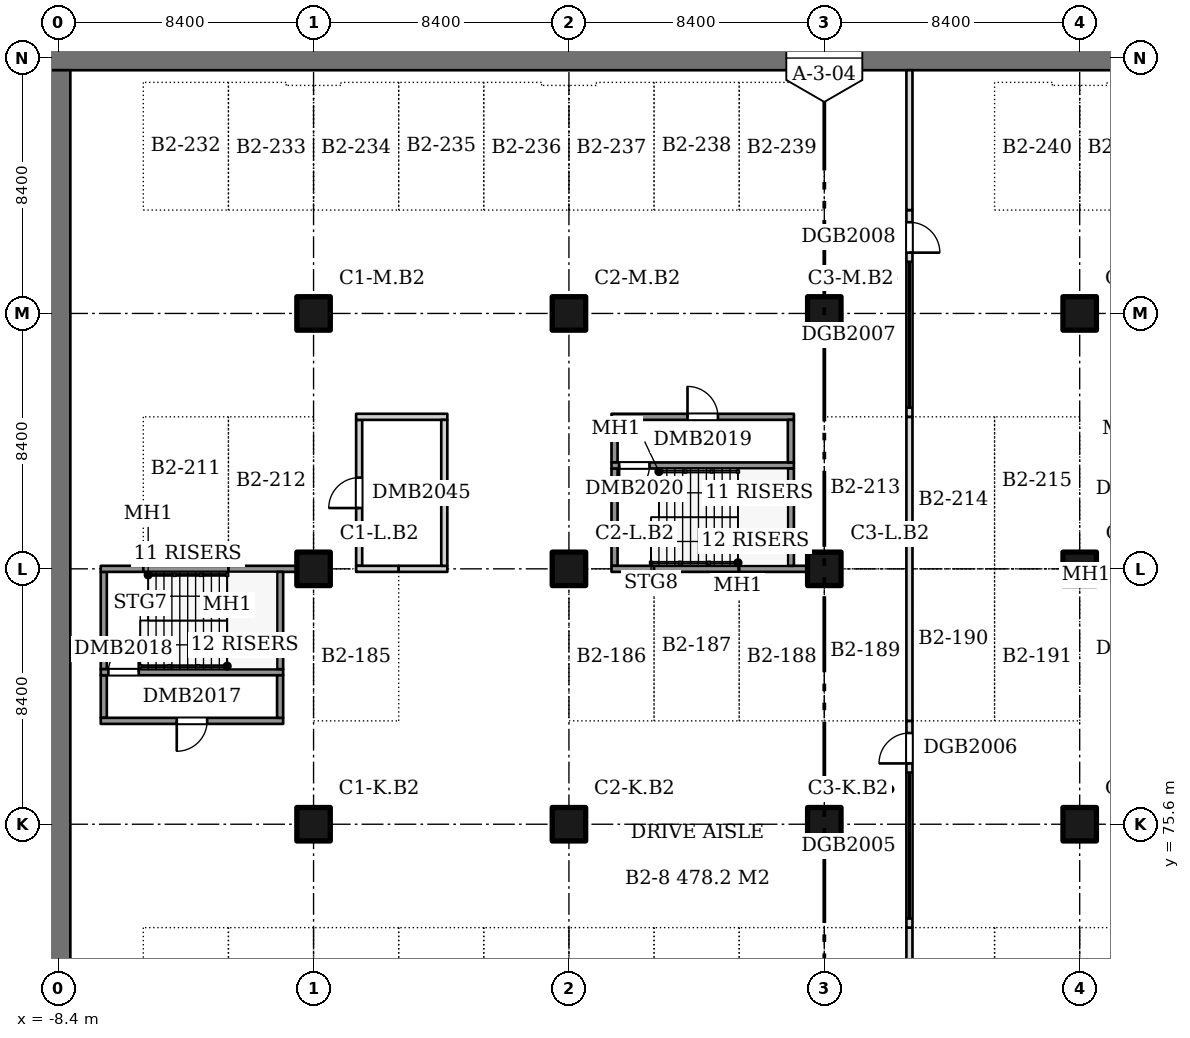
"""IFC4 building model, lengths in metres.
Left out: names, types, materials, properties, quantities, classifications, styles, units other than length and angle.
Written with IfcOpenShell. Run it as: python <this file> out.ifc"""

import sys

from ifc_helpers import new_model, si_unit, direction, frame, frame_2d, origin, origin_2d, place, context, subcontext, project, spatial, rectangle, extrude, element, fill, save


model = new_model("IFC4")
c1 = context("Model", 3, precision=1e-05, world=origin(), true_north=direction((0.0, 1.0)))
c2 = subcontext(c1, "Body", "Model", "MODEL_VIEW")
j1 = project(units=[si_unit("LENGTHUNIT", "METRE"), si_unit("PLANEANGLEUNIT", "RADIAN")], contexts=[c1])
p1 = place(None, origin())
s1 = spatial("IfcSite", under=j1, at=p1, CompositionType="ELEMENT")
p2 = place(p1, origin())
s2 = spatial("IfcBuilding", under=s1, at=p2, CompositionType="ELEMENT")
p3 = place(p2, frame((0.0, 0.0, -8.0)))
s3 = spatial("IfcBuildingStorey", under=s2, at=p3, CompositionType="ELEMENT", Elevation=-8.0)
p4 = place(p3, frame((-8.8, 100.8, 0.0), z_axis=(0.0, 0.0, 1.0), x_axis=(1.0, 0.0, 0.0)))
e1 = element("IfcWall", 1, at=p4, inside=s3, PredefinedType="SOLIDWALL", context=c2, shape_type="SweptSolid", body=[
    extrude(rectangle(XDim=135.2, YDim=0.8, at=frame_2d((67.6, 0.0))), origin(), (0.0, 0.0, 1.0), 3.7),
])
p5 = place(p3, frame((-8.4, 0.4, 0.0), z_axis=(0.0, 0.0, 1.0), x_axis=(0.0, 1.0, 0.0)))
e2 = element("IfcWall", 2, at=p5, inside=s3, PredefinedType="SOLIDWALL", context=c2, shape_type="SweptSolid", body=[
    extrude(rectangle(XDim=100.0, YDim=0.8, at=frame_2d((50.0, 0.0))), origin(), (0.0, 0.0, 1.0), 3.7),
])
for number, where, z_axis, x_axis in (
    (3, (0.0, 75.6, 0.0), (0.0, 0.0, 1.0), (1.0, 0.0, 0.0)),
    (4, (0.0, 84.0, 0.0), (0.0, 0.0, 1.0), (1.0, 0.0, 0.0)),
    (5, (0.0, 92.4, 0.0), (0.0, 0.0, 1.0), (1.0, 0.0, 0.0)),
    (6, (8.4, 75.6, 0.0), (0.0, 0.0, 1.0), (1.0, 0.0, 0.0)),
    (7, (8.4, 84.0, 0.0), (0.0, 0.0, 1.0), (1.0, 0.0, 0.0)),
    (8, (8.4, 92.4, 0.0), (0.0, 0.0, 1.0), (1.0, 0.0, 0.0)),
    (9, (16.8, 75.6, 0.0), (0.0, 0.0, 1.0), (1.0, 0.0, 0.0)),
    (10, (16.8, 84.0, 0.0), (0.0, 0.0, 1.0), (1.0, 0.0, 0.0)),
    (11, (16.8, 92.4, 0.0), (0.0, 0.0, 1.0), (1.0, 0.0, 0.0)),
    (12, (25.2, 75.6, 0.0), (0.0, 0.0, 1.0), (1.0, 0.0, 0.0)),
    (13, (25.2, 84.0, 0.0), (0.0, 0.0, 1.0), (1.0, 0.0, 0.0)),
    (14, (25.2, 92.4, 0.0), (0.0, 0.0, 1.0), (1.0, 0.0, 0.0)),
):
    element("IfcColumn", number, at=place(p3, frame(where, z_axis=z_axis, x_axis=x_axis)), inside=s3, PredefinedType="COLUMN", context=c2, shape_type="SweptSolid", body=[
        extrude(rectangle(XDim=1.1, YDim=1.1, at=origin_2d()), origin(), (0.0, 0.0, 1.0), 3.7),
    ])
p6 = place(p3, frame((-6.9, 79.1, 0.0), z_axis=(0.0, 0.0, 1.0), x_axis=(0.0, 1.0, 0.0)))
e15 = element("IfcWall", 15, at=p6, inside=s3, PredefinedType="SOLIDWALL", context=c2, shape_type="SweptSolid", body=[
    extrude(rectangle(XDim=1.4, YDim=0.2, at=frame_2d((0.7, 0.0))), origin(), (0.0, 0.0, 1.0), 3.7),
])
p7 = place(p3, frame((-7.0, 79.0, 0.0), z_axis=(0.0, 0.0, 1.0), x_axis=(1.0, 0.0, 0.0)))
e16 = element("IfcWall", 16, at=p7, inside=s3, PredefinedType="SOLIDWALL", context=c2, shape_type="SweptSolid", body=[
    extrude(rectangle(XDim=6.0, YDim=0.2, at=frame_2d((3.0, 0.0))), origin(), (0.0, 0.0, 1.0), 3.7),
])
p8 = place(p7, frame((2.5, 0.0, 0.0)))
e17 = element("IfcOpeningElement", 17, at=p8, cuts=e16, PredefinedType="OPENING", context=c2, shape_type="SweptSolid", body=[
    extrude(rectangle(XDim=1.0, YDim=2.1, at=frame_2d((0.5, 1.05))), frame((0.0, 0.11, 0.0), z_axis=(0.0, -1.0, 0.0), x_axis=(1.0, 0.0, 0.0)), (0.0, 0.0, 1.0), 0.22),
])
p9 = place(p3, frame((-6.9, 80.7, 0.0), z_axis=(0.0, 0.0, 1.0), x_axis=(0.0, 1.0, 0.0)))
e18 = element("IfcWall", 18, at=p9, inside=s3, PredefinedType="SOLIDWALL", context=c2, shape_type="SweptSolid", body=[
    extrude(rectangle(XDim=3.2, YDim=0.2, at=frame_2d((1.6, 0.0))), origin(), (0.0, 0.0, 1.0), 3.7),
])
p10 = place(p3, frame((-7.0, 80.6, 0.0), z_axis=(0.0, 0.0, 1.0), x_axis=(1.0, 0.0, 0.0)))
e19 = element("IfcWall", 19, at=p10, inside=s3, PredefinedType="SOLIDWALL", context=c2, shape_type="SweptSolid", body=[
    extrude(rectangle(XDim=6.0, YDim=0.2, at=frame_2d((3.0, 0.0))), origin(), (0.0, 0.0, 1.0), 3.7),
])
p11 = place(p10, frame((0.25, 0.0, 0.0)))
e20 = element("IfcOpeningElement", 20, at=p11, cuts=e19, PredefinedType="OPENING", context=c2, shape_type="SweptSolid", body=[
    extrude(rectangle(XDim=1.0, YDim=2.1, at=frame_2d((0.5, 1.05))), frame((0.0, 0.11, 0.0), z_axis=(0.0, -1.0, 0.0), x_axis=(1.0, 0.0, 0.0)), (0.0, 0.0, 1.0), 0.22),
])
p12 = place(p3, frame((-7.0, 84.0, 0.0), z_axis=(0.0, 0.0, 1.0), x_axis=(1.0, 0.0, 0.0)))
e21 = element("IfcWall", 21, at=p12, inside=s3, PredefinedType="SOLIDWALL", context=c2, shape_type="SweptSolid", body=[
    extrude(rectangle(XDim=1.4, YDim=0.2, at=frame_2d((0.7, 0.0))), origin(), (0.0, 0.0, 1.0), 3.7),
])
p13 = place(p3, frame((-5.6, 84.0, 0.0), z_axis=(0.0, 0.0, 1.0), x_axis=(1.0, 0.0, 0.0)))
e22 = element("IfcWall", 22, at=p13, inside=s3, PredefinedType="SOLIDWALL", context=c2, shape_type="SweptSolid", body=[
    extrude(rectangle(XDim=2.8, YDim=0.2, at=frame_2d((1.4, 0.0))), origin(), (0.0, 0.0, 1.0), 3.7),
])
p14 = place(p3, frame((-2.8, 84.0, 0.0), z_axis=(0.0, 0.0, 1.0), x_axis=(1.0, 0.0, 0.0)))
e23 = element("IfcWall", 23, at=p14, inside=s3, PredefinedType="SOLIDWALL", context=c2, shape_type="SweptSolid", body=[
    extrude(rectangle(XDim=2.25, YDim=0.2, at=frame_2d((1.125, 0.0))), origin(), (0.0, 0.0, 1.0), 3.7),
])
p15 = place(p3, frame((-1.1, 79.1, 0.0), z_axis=(0.0, 0.0, 1.0), x_axis=(0.0, 1.0, 0.0)))
e24 = element("IfcWall", 24, at=p15, inside=s3, PredefinedType="SOLIDWALL", context=c2, shape_type="SweptSolid", body=[
    extrude(rectangle(XDim=1.4, YDim=0.2, at=frame_2d((0.7, 0.0))), origin(), (0.0, 0.0, 1.0), 3.7),
])
p16 = place(p3, frame((-1.1, 80.7, 0.0), z_axis=(0.0, 0.0, 1.0), x_axis=(0.0, 1.0, 0.0)))
e25 = element("IfcWall", 25, at=p16, inside=s3, PredefinedType="SOLIDWALL", context=c2, shape_type="SweptSolid", body=[
    extrude(rectangle(XDim=3.2, YDim=0.2, at=frame_2d((1.6, 0.0))), origin(), (0.0, 0.0, 1.0), 3.7),
])
p17 = place(p3, frame((1.5, 84.1, 0.0), z_axis=(0.0, 0.0, 1.0), x_axis=(0.0, 1.0, 0.0)))
e26 = element("IfcWall", 26, at=p17, inside=s3, PredefinedType="PARTITIONING", context=c2, shape_type="SweptSolid", body=[
    extrude(rectangle(XDim=4.8, YDim=0.2, at=frame_2d((2.4, 0.0))), origin(), (0.0, 0.0, 1.0), 3.7),
])
p18 = place(p17, frame((1.9, 0.0, 0.0)))
e27 = element("IfcOpeningElement", 27, at=p18, cuts=e26, PredefinedType="OPENING", context=c2, shape_type="SweptSolid", body=[
    extrude(rectangle(XDim=1.0, YDim=2.1, at=frame_2d((0.5, 1.05))), frame((0.0, 0.11, 0.0), z_axis=(0.0, -1.0, 0.0), x_axis=(1.0, 0.0, 0.0)), (0.0, 0.0, 1.0), 0.22),
])
p19 = place(p3, frame((1.4, 84.0, 0.0), z_axis=(0.0, 0.0, 1.0), x_axis=(1.0, 0.0, 0.0)))
e28 = element("IfcWall", 28, at=p19, inside=s3, PredefinedType="PARTITIONING", context=c2, shape_type="SweptSolid", body=[
    extrude(rectangle(XDim=1.4, YDim=0.2, at=frame_2d((0.7, 0.0))), origin(), (0.0, 0.0, 1.0), 3.7),
])
p20 = place(p3, frame((1.4, 89.0, 0.0), z_axis=(0.0, 0.0, 1.0), x_axis=(1.0, 0.0, 0.0)))
e29 = element("IfcWall", 29, at=p20, inside=s3, PredefinedType="PARTITIONING", context=c2, shape_type="SweptSolid", body=[
    extrude(rectangle(XDim=3.0, YDim=0.2, at=frame_2d((1.5, 0.0))), origin(), (0.0, 0.0, 1.0), 3.7),
])
p21 = place(p3, frame((2.8, 84.0, 0.0), z_axis=(0.0, 0.0, 1.0), x_axis=(1.0, 0.0, 0.0)))
e30 = element("IfcWall", 30, at=p21, inside=s3, PredefinedType="PARTITIONING", context=c2, shape_type="SweptSolid", body=[
    extrude(rectangle(XDim=1.6, YDim=0.2, at=frame_2d((0.8, 0.0))), origin(), (0.0, 0.0, 1.0), 3.7),
])
p22 = place(p3, frame((4.3, 84.1, 0.0), z_axis=(0.0, 0.0, 1.0), x_axis=(0.0, 1.0, 0.0)))
e31 = element("IfcWall", 31, at=p22, inside=s3, PredefinedType="PARTITIONING", context=c2, shape_type="SweptSolid", body=[
    extrude(rectangle(XDim=4.8, YDim=0.2, at=frame_2d((2.4, 0.0))), origin(), (0.0, 0.0, 1.0), 3.7),
])
p23 = place(p3, frame((9.9, 84.1, 0.0), z_axis=(0.0, 0.0, 1.0), x_axis=(0.0, 1.0, 0.0)))
e32 = element("IfcWall", 32, at=p23, inside=s3, PredefinedType="SOLIDWALL", context=c2, shape_type="SweptSolid", body=[
    extrude(rectangle(XDim=3.2, YDim=0.2, at=frame_2d((1.6, 0.0))), origin(), (0.0, 0.0, 1.0), 3.7),
])
for number, where, z_axis, x_axis in (
    (33, (9.8, 84.0, 0.0), (0.0, 0.0, 1.0), (1.0, 0.0, 0.0)),
    (34, (9.9, 87.5, 0.0), (0.0, 0.0, 1.0), (0.0, 1.0, 0.0)),
):
    element("IfcWall", number, at=place(p3, frame(where, z_axis=z_axis, x_axis=x_axis)), inside=s3, PredefinedType="SOLIDWALL", context=c2, shape_type="SweptSolid", body=[
        extrude(rectangle(XDim=1.4, YDim=0.2, at=frame_2d((0.7, 0.0))), origin(), (0.0, 0.0, 1.0), 3.7),
    ])
p24 = place(p3, frame((9.8, 87.4, 0.0), z_axis=(0.0, 0.0, 1.0), x_axis=(1.0, 0.0, 0.0)))
e35 = element("IfcWall", 35, at=p24, inside=s3, PredefinedType="SOLIDWALL", context=c2, shape_type="SweptSolid", body=[
    extrude(rectangle(XDim=6.0, YDim=0.2, at=frame_2d((3.0, 0.0))), origin(), (0.0, 0.0, 1.0), 3.7),
])
p25 = place(p24, frame((0.25, 0.0, 0.0)))
e36 = element("IfcOpeningElement", 36, at=p25, cuts=e35, PredefinedType="OPENING", context=c2, shape_type="SweptSolid", body=[
    extrude(rectangle(XDim=1.0, YDim=2.1, at=frame_2d((0.5, 1.05))), frame((0.0, 0.11, 0.0), z_axis=(0.0, -1.0, 0.0), x_axis=(1.0, 0.0, 0.0)), (0.0, 0.0, 1.0), 0.22),
])
p26 = place(p3, frame((9.8, 89.0, 0.0), z_axis=(0.0, 0.0, 1.0), x_axis=(1.0, 0.0, 0.0)))
e37 = element("IfcWall", 37, at=p26, inside=s3, PredefinedType="SOLIDWALL", context=c2, shape_type="SweptSolid", body=[
    extrude(rectangle(XDim=6.0, YDim=0.2, at=frame_2d((3.0, 0.0))), origin(), (0.0, 0.0, 1.0), 3.7),
])
p27 = place(p26, frame((2.5, 0.0, 0.0)))
e38 = element("IfcOpeningElement", 38, at=p27, cuts=e37, PredefinedType="OPENING", context=c2, shape_type="SweptSolid", body=[
    extrude(rectangle(XDim=1.0, YDim=2.1, at=frame_2d((0.5, 1.05))), frame((0.0, 0.11, 0.0), z_axis=(0.0, -1.0, 0.0), x_axis=(1.0, 0.0, 0.0)), (0.0, 0.0, 1.0), 0.22),
])
p28 = place(p3, frame((11.2, 84.0, 0.0), z_axis=(0.0, 0.0, 1.0), x_axis=(1.0, 0.0, 0.0)))
e39 = element("IfcWall", 39, at=p28, inside=s3, PredefinedType="SOLIDWALL", context=c2, shape_type="SweptSolid", body=[
    extrude(rectangle(XDim=2.8, YDim=0.2, at=frame_2d((1.4, 0.0))), origin(), (0.0, 0.0, 1.0), 3.7),
])
p29 = place(p3, frame((14.0, 84.0, 0.0), z_axis=(0.0, 0.0, 1.0), x_axis=(1.0, 0.0, 0.0)))
e40 = element("IfcWall", 40, at=p29, inside=s3, PredefinedType="SOLIDWALL", context=c2, shape_type="SweptSolid", body=[
    extrude(rectangle(XDim=2.25, YDim=0.2, at=frame_2d((1.125, 0.0))), origin(), (0.0, 0.0, 1.0), 3.7),
])
p30 = place(p3, frame((15.7, 84.1, 0.0), z_axis=(0.0, 0.0, 1.0), x_axis=(0.0, 1.0, 0.0)))
e41 = element("IfcWall", 41, at=p30, inside=s3, PredefinedType="SOLIDWALL", context=c2, shape_type="SweptSolid", body=[
    extrude(rectangle(XDim=3.2, YDim=0.2, at=frame_2d((1.6, 0.0))), origin(), (0.0, 0.0, 1.0), 3.7),
])
p31 = place(p3, frame((15.7, 87.5, 0.0), z_axis=(0.0, 0.0, 1.0), x_axis=(0.0, 1.0, 0.0)))
e42 = element("IfcWall", 42, at=p31, inside=s3, PredefinedType="SOLIDWALL", context=c2, shape_type="SweptSolid", body=[
    extrude(rectangle(XDim=1.4, YDim=0.2, at=frame_2d((0.7, 0.0))), origin(), (0.0, 0.0, 1.0), 3.7),
])
p32 = place(p3, frame((19.6, 62.2, 0.0), z_axis=(0.0, 0.0, 1.0), x_axis=(0.0, 1.0, 0.0)))
e43 = element("IfcWall", 43, at=p32, inside=s3, PredefinedType="PARTITIONING", context=c2, shape_type="SweptSolid", body=[
    extrude(rectangle(XDim=10.0, YDim=0.2, at=frame_2d((5.0, 0.0))), origin(), (0.0, 0.0, 1.0), 3.7),
])
p33 = place(p3, frame((19.6, 72.2, 0.0), z_axis=(0.0, 0.0, 1.0), x_axis=(0.0, 1.0, 0.0)))
e44 = element("IfcWall", 44, at=p33, inside=s3, PredefinedType="PARTITIONING", context=c2, shape_type="SweptSolid", body=[
    extrude(rectangle(XDim=6.8, YDim=0.2, at=frame_2d((3.4, 0.0))), origin(), (0.0, 0.0, 1.0), 3.7),
])
p34 = place(p33, frame((0.3, 0.0, 0.0)))
e45 = element("IfcOpeningElement", 45, at=p34, cuts=e44, PredefinedType="OPENING", context=c2, shape_type="SweptSolid", body=[
    extrude(rectangle(XDim=4.8, YDim=2.4, at=frame_2d((2.4, 1.2))), frame((0.0, 0.11, 0.0), z_axis=(0.0, -1.0, 0.0), x_axis=(1.0, 0.0, 0.0)), (0.0, 0.0, 1.0), 0.22),
])
p35 = place(p33, frame((5.4, 0.0, 0.0)))
e46 = element("IfcOpeningElement", 46, at=p35, cuts=e44, PredefinedType="OPENING", context=c2, shape_type="SweptSolid", body=[
    extrude(rectangle(XDim=1.0, YDim=2.1, at=frame_2d((0.5, 1.05))), frame((0.0, 0.11, 0.0), z_axis=(0.0, -1.0, 0.0), x_axis=(1.0, 0.0, 0.0)), (0.0, 0.0, 1.0), 0.22),
])
p36 = place(p3, frame((19.6, 79.0, 0.0), z_axis=(0.0, 0.0, 1.0), x_axis=(0.0, 1.0, 0.0)))
e47 = element("IfcWall", 47, at=p36, inside=s3, PredefinedType="PARTITIONING", context=c2, shape_type="SweptSolid", body=[
    extrude(rectangle(XDim=10.0, YDim=0.2, at=frame_2d((5.0, 0.0))), origin(), (0.0, 0.0, 1.0), 3.7),
])
p37 = place(p3, frame((19.6, 89.0, 0.0), z_axis=(0.0, 0.0, 1.0), x_axis=(0.0, 1.0, 0.0)))
e48 = element("IfcWall", 48, at=p37, inside=s3, PredefinedType="PARTITIONING", context=c2, shape_type="SweptSolid", body=[
    extrude(rectangle(XDim=6.8, YDim=0.2, at=frame_2d((3.4, 0.0))), origin(), (0.0, 0.0, 1.0), 3.7),
])
p38 = place(p37, frame((0.3, 0.0, 0.0)))
e49 = element("IfcOpeningElement", 49, at=p38, cuts=e48, PredefinedType="OPENING", context=c2, shape_type="SweptSolid", body=[
    extrude(rectangle(XDim=4.8, YDim=2.4, at=frame_2d((2.4, 1.2))), frame((0.0, 0.11, 0.0), z_axis=(0.0, -1.0, 0.0), x_axis=(1.0, 0.0, 0.0)), (0.0, 0.0, 1.0), 0.22),
])
p39 = place(p37, frame((5.4, 0.0, 0.0)))
e50 = element("IfcOpeningElement", 50, at=p39, cuts=e48, PredefinedType="OPENING", context=c2, shape_type="SweptSolid", body=[
    extrude(rectangle(XDim=1.0, YDim=2.1, at=frame_2d((0.5, 1.05))), frame((0.0, 0.11, 0.0), z_axis=(0.0, -1.0, 0.0), x_axis=(1.0, 0.0, 0.0)), (0.0, 0.0, 1.0), 0.22),
])
p40 = place(p3, frame((19.6, 95.8, 0.0), z_axis=(0.0, 0.0, 1.0), x_axis=(0.0, 1.0, 0.0)))
e51 = element("IfcWall", 51, at=p40, inside=s3, PredefinedType="PARTITIONING", context=c2, shape_type="SweptSolid", body=[
    extrude(rectangle(XDim=4.6, YDim=0.2, at=frame_2d((2.3, 0.0))), origin(), (0.0, 0.0, 1.0), 3.7),
])
p41 = place(p8, frame((1.0, 0.0, 0.0), z_axis=(0.0, 0.0, 1.0), x_axis=(-1.0, 0.0, 0.0)))
e52 = element("IfcDoor", 52, at=p41, inside=s3, OperationType="SINGLE_SWING_RIGHT", PredefinedType="DOOR", context=c2, shape_type="SweptSolid", body=[
    extrude(rectangle(XDim=1.0, YDim=2.1, at=frame_2d((0.5, 1.05))), frame((0.0, 0.025, 0.0), z_axis=(0.0, -1.0, 0.0), x_axis=(1.0, 0.0, 0.0)), (0.0, 0.0, 1.0), 0.05),
])
fill(e17, e52)
p42 = place(p11, origin())
e53 = element("IfcDoor", 53, at=p42, inside=s3, OperationType="SINGLE_SWING_RIGHT", PredefinedType="DOOR", context=c2, shape_type="SweptSolid", body=[
    extrude(rectangle(XDim=1.0, YDim=2.1, at=frame_2d((0.5, 1.05))), frame((0.0, 0.025, 0.0), z_axis=(0.0, -1.0, 0.0), x_axis=(1.0, 0.0, 0.0)), (0.0, 0.0, 1.0), 0.05),
])
fill(e20, e53)
p43 = place(p27, origin())
e54 = element("IfcDoor", 54, at=p43, inside=s3, OperationType="SINGLE_SWING_LEFT", PredefinedType="DOOR", context=c2, shape_type="SweptSolid", body=[
    extrude(rectangle(XDim=1.0, YDim=2.1, at=frame_2d((0.5, 1.05))), frame((0.0, 0.025, 0.0), z_axis=(0.0, -1.0, 0.0), x_axis=(1.0, 0.0, 0.0)), (0.0, 0.0, 1.0), 0.05),
])
fill(e38, e54)
p44 = place(p25, frame((1.0, 0.0, 0.0), z_axis=(0.0, 0.0, 1.0), x_axis=(-1.0, 0.0, 0.0)))
e55 = element("IfcDoor", 55, at=p44, inside=s3, OperationType="SINGLE_SWING_RIGHT", PredefinedType="DOOR", context=c2, shape_type="SweptSolid", body=[
    extrude(rectangle(XDim=1.0, YDim=2.1, at=frame_2d((0.5, 1.05))), frame((0.0, 0.025, 0.0), z_axis=(0.0, -1.0, 0.0), x_axis=(1.0, 0.0, 0.0)), (0.0, 0.0, 1.0), 0.05),
])
fill(e36, e55)
p45 = place(p18, origin())
e56 = element("IfcDoor", 56, at=p45, inside=s3, OperationType="SINGLE_SWING_LEFT", PredefinedType="DOOR", context=c2, shape_type="SweptSolid", body=[
    extrude(rectangle(XDim=1.0, YDim=2.1, at=frame_2d((0.5, 1.05))), frame((0.0, 0.025, 0.0), z_axis=(0.0, -1.0, 0.0), x_axis=(1.0, 0.0, 0.0)), (0.0, 0.0, 1.0), 0.05),
])
fill(e27, e56)
p46 = place(p34, origin())
e57 = element("IfcDoor", 57, at=p46, inside=s3, OperationType="ROLLINGUP", PredefinedType="GATE", context=c2, shape_type="SweptSolid", body=[
    extrude(rectangle(XDim=4.8, YDim=2.4, at=frame_2d((2.4, 1.2))), frame((0.0, 0.025, 0.0), z_axis=(0.0, -1.0, 0.0), x_axis=(1.0, 0.0, 0.0)), (0.0, 0.0, 1.0), 0.05),
])
fill(e45, e57)
p47 = place(p35, origin())
e58 = element("IfcDoor", 58, at=p47, inside=s3, OperationType="SINGLE_SWING_LEFT", PredefinedType="DOOR", context=c2, shape_type="SweptSolid", body=[
    extrude(rectangle(XDim=1.0, YDim=2.1, at=frame_2d((0.5, 1.05))), frame((0.0, 0.025, 0.0), z_axis=(0.0, -1.0, 0.0), x_axis=(1.0, 0.0, 0.0)), (0.0, 0.0, 1.0), 0.05),
])
fill(e46, e58)
p48 = place(p38, origin())
e59 = element("IfcDoor", 59, at=p48, inside=s3, OperationType="ROLLINGUP", PredefinedType="GATE", context=c2, shape_type="SweptSolid", body=[
    extrude(rectangle(XDim=4.8, YDim=2.4, at=frame_2d((2.4, 1.2))), frame((0.0, 0.025, 0.0), z_axis=(0.0, -1.0, 0.0), x_axis=(1.0, 0.0, 0.0)), (0.0, 0.0, 1.0), 0.05),
])
fill(e49, e59)
p49 = place(p39, frame((1.0, 0.0, 0.0), z_axis=(0.0, 0.0, 1.0), x_axis=(-1.0, 0.0, 0.0)))
e60 = element("IfcDoor", 60, at=p49, inside=s3, OperationType="SINGLE_SWING_RIGHT", PredefinedType="DOOR", context=c2, shape_type="SweptSolid", body=[
    extrude(rectangle(XDim=1.0, YDim=2.1, at=frame_2d((0.5, 1.05))), frame((0.0, 0.025, 0.0), z_axis=(0.0, -1.0, 0.0), x_axis=(1.0, 0.0, 0.0)), (0.0, 0.0, 1.0), 0.05),
])
fill(e50, e60)
save(model, sys.argv[1])
